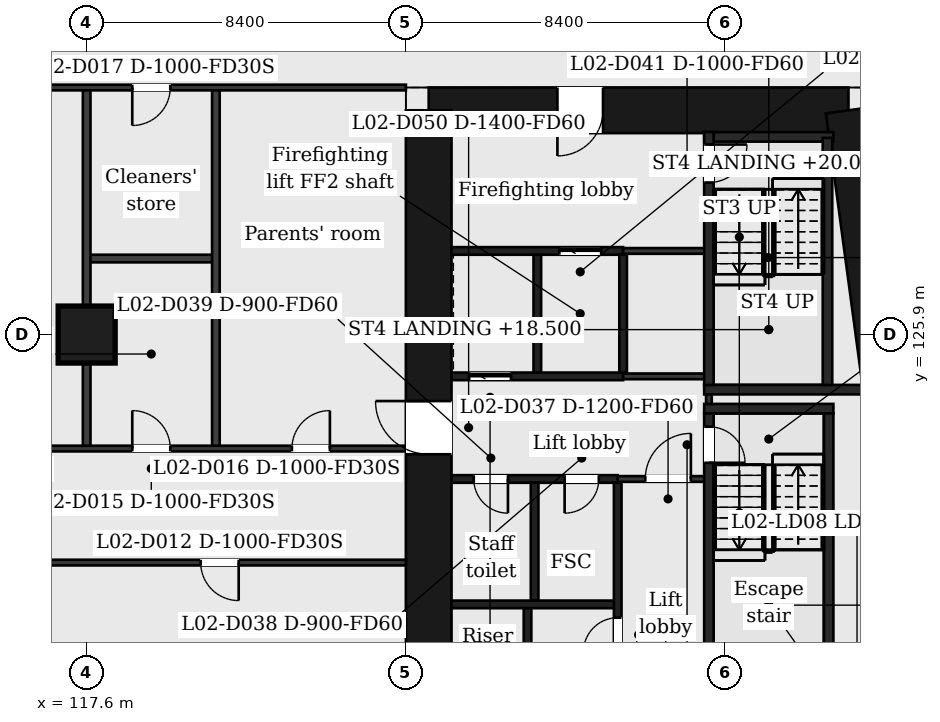
"""IFC4 building model, lengths in metres.
Left out: names, types, materials, properties, quantities, classifications, styles, units other than length and angle.
Written with IfcOpenShell. Run it as: python <this file> out.ifc"""

import sys

from ifc_helpers import new_model, si_unit, direction, frame, frame_2d, origin, origin_2d, place, context, subcontext, project, spatial, rectangle, extrude, element, fill, save


model = new_model("IFC4")
c1 = context("Model", 3, precision=1e-05, world=origin(), true_north=direction((0.0, 1.0)))
c2 = subcontext(c1, "Body", "Model", "MODEL_VIEW")
j1 = project(units=[si_unit("LENGTHUNIT", "METRE"), si_unit("PLANEANGLEUNIT", "RADIAN")], contexts=[c1])
p1 = place(None, origin())
s1 = spatial("IfcSite", under=j1, at=p1, CompositionType="ELEMENT")
p2 = place(p1, origin())
s2 = spatial("IfcBuilding", under=s1, at=p2, CompositionType="ELEMENT")
p3 = place(p2, frame((0.0, 0.0, 17.0)))
s3 = spatial("IfcBuildingStorey", under=s2, at=p3, CompositionType="ELEMENT", Elevation=17.0)
p4 = place(p3, frame((126.6, 131.8, 0.0), z_axis=(0.0, 0.0, 1.0), x_axis=(1.0, 0.0, 0.0)))
e1 = element("IfcWall", 1, at=p4, inside=s3, PredefinedType="SHEAR", context=c2, shape_type="SweptSolid", body=[
    extrude(rectangle(XDim=11.044, YDim=1.2, at=frame_2d((5.522, 0.0))), origin(), (0.0, 0.0, 1.0), 6.0),
])
p5 = place(p4, frame((3.386, 0.0, 0.0)))
e2 = element("IfcOpeningElement", 2, at=p5, cuts=e1, PredefinedType="OPENING", context=c2, shape_type="SweptSolid", body=[
    extrude(rectangle(XDim=1.2, YDim=2.1, at=frame_2d((0.6, 1.05))), frame((0.0, 0.61, 0.0), z_axis=(0.0, -1.0, 0.0), x_axis=(1.0, 0.0, 0.0)), (0.0, 0.0, 1.0), 1.22),
])
p6 = place(p3, frame((137.645, 131.8, 0.0), z_axis=(0.0, 0.0, 1.0), x_axis=(0.133413989637, -0.99106039542, 0.0)))
e3 = element("IfcWall", 3, at=p6, inside=s3, PredefinedType="SHEAR", context=c2, shape_type="SweptSolid", body=[
    extrude(rectangle(XDim=20.988, YDim=1.2, at=frame_2d((10.494, 0.0))), origin(), (0.0, 0.0, 1.0), 6.0),
])
p7 = place(p3, frame((126.6, 111.0, 0.0), z_axis=(0.0, 0.0, 1.0), x_axis=(0.0, 1.0, 0.0)))
e4 = element("IfcWall", 4, at=p7, inside=s3, PredefinedType="SHEAR", context=c2, shape_type="SweptSolid", body=[
    extrude(rectangle(XDim=20.8, YDim=1.2, at=frame_2d((10.4, 0.0))), origin(), (0.0, 0.0, 1.0), 6.0),
])
p8 = place(p7, frame((11.75, 0.0, 0.0)))
e5 = element("IfcOpeningElement", 5, at=p8, cuts=e4, PredefinedType="OPENING", context=c2, shape_type="SweptSolid", body=[
    extrude(rectangle(XDim=1.4, YDim=2.1, at=frame_2d((0.7, 1.05))), frame((0.0, 0.61, 0.0), z_axis=(0.0, -1.0, 0.0), x_axis=(1.0, 0.0, 0.0)), (0.0, 0.0, 1.0), 1.22),
])
p9 = place(p3, frame((117.6, 125.9, 0.0), z_axis=(0.0, 0.0, 1.0), x_axis=(1.0, 0.0, 0.0)))
e6 = element("IfcColumn", 6, at=p9, inside=s3, PredefinedType="COLUMN", context=c2, shape_type="SweptSolid", body=[
    extrude(rectangle(XDim=1.5, YDim=1.5, at=origin_2d()), origin(), (0.0, 0.0, 1.0), 6.0),
])
p10 = place(p3, frame((127.2, 118.8, 0.0), z_axis=(0.0, 0.0, 1.0), x_axis=(1.0, 0.0, 0.0)))
e7 = element("IfcWall", 7, at=p10, inside=s3, PredefinedType="PARTITIONING", context=c2, shape_type="SweptSolid", body=[
    extrude(rectangle(XDim=4.373, YDim=0.2, at=frame_2d((2.187, 0.0))), origin(), (0.0, 0.0, 1.0), 5.5),
])
p11 = place(p3, frame((100.8, 119.9, 0.0), z_axis=(0.0, 0.0, 1.0), x_axis=(1.0, 0.0, 0.0)))
e8 = element("IfcWall", 8, at=p11, inside=s3, PredefinedType="PARTITIONING", context=c2, shape_type="SweptSolid", body=[
    extrude(rectangle(XDim=25.2, YDim=0.15, at=frame_2d((12.6, 0.0))), origin(), (0.0, 0.0, 1.0), 5.5),
])
p12 = place(p11, frame((3.7, 0.0, 0.0)))
e9 = element("IfcOpeningElement", 9, at=p12, cuts=e8, PredefinedType="OPENING", context=c2, shape_type="SweptSolid", body=[
    extrude(rectangle(XDim=1.0, YDim=2.1, at=frame_2d((0.5, 1.05))), frame((0.0, 0.085, 0.0), z_axis=(0.0, -1.0, 0.0), x_axis=(1.0, 0.0, 0.0)), (0.0, 0.0, 1.0), 0.17),
])
p13 = place(p11, frame((11.4, 0.0, 0.0)))
e10 = element("IfcOpeningElement", 10, at=p13, cuts=e8, PredefinedType="OPENING", context=c2, shape_type="SweptSolid", body=[
    extrude(rectangle(XDim=1.0, YDim=2.1, at=frame_2d((0.5, 1.05))), frame((0.0, 0.085, 0.0), z_axis=(0.0, -1.0, 0.0), x_axis=(1.0, 0.0, 0.0)), (0.0, 0.0, 1.0), 0.17),
])
p14 = place(p11, frame((19.8, 0.0, 0.0)))
e11 = element("IfcOpeningElement", 11, at=p14, cuts=e8, PredefinedType="OPENING", context=c2, shape_type="SweptSolid", body=[
    extrude(rectangle(XDim=1.0, YDim=2.1, at=frame_2d((0.5, 1.05))), frame((0.0, 0.085, 0.0), z_axis=(0.0, -1.0, 0.0), x_axis=(1.0, 0.0, 0.0)), (0.0, 0.0, 1.0), 0.17),
])
p15 = place(p3, frame((127.2, 122.1, 0.0), z_axis=(0.0, 0.0, 1.0), x_axis=(1.0, 0.0, 0.0)))
e12 = element("IfcWall", 12, at=p15, inside=s3, PredefinedType="PARTITIONING", context=c2, shape_type="SweptSolid", body=[
    extrude(rectangle(XDim=4.373, YDim=0.2, at=frame_2d((2.187, 0.0))), origin(), (0.0, 0.0, 1.0), 5.5),
])
p16 = place(p15, frame((2.976, 0.0, 0.0)))
e13 = element("IfcOpeningElement", 13, at=p16, cuts=e12, PredefinedType="OPENING", context=c2, shape_type="SweptSolid", body=[
    extrude(rectangle(XDim=0.9, YDim=2.1, at=frame_2d((0.45, 1.05))), frame((0.0, 0.11, 0.0), z_axis=(0.0, -1.0, 0.0), x_axis=(1.0, 0.0, 0.0)), (0.0, 0.0, 1.0), 0.22),
])
p17 = place(p15, frame((0.585, 0.0, 0.0)))
e14 = element("IfcOpeningElement", 14, at=p17, cuts=e12, PredefinedType="OPENING", context=c2, shape_type="SweptSolid", body=[
    extrude(rectangle(XDim=0.9, YDim=2.1, at=frame_2d((0.45, 1.05))), frame((0.0, 0.11, 0.0), z_axis=(0.0, -1.0, 0.0), x_axis=(1.0, 0.0, 0.0)), (0.0, 0.0, 1.0), 0.22),
])
p18 = place(p3, frame((131.573, 122.1, 0.0), z_axis=(0.0, 0.0, 1.0), x_axis=(1.0, 0.0, 0.0)))
e15 = element("IfcWall", 15, at=p18, inside=s3, PredefinedType="PARTITIONING", context=c2, shape_type="SweptSolid", body=[
    extrude(rectangle(XDim=2.4, YDim=0.15, at=frame_2d((1.2, 0.0))), origin(), (0.0, 0.0, 1.0), 5.5),
])
p19 = place(p18, frame((0.725, 0.0, 0.0)))
e16 = element("IfcOpeningElement", 16, at=p19, cuts=e15, PredefinedType="OPENING", context=c2, shape_type="SweptSolid", body=[
    extrude(rectangle(XDim=1.2, YDim=2.1, at=frame_2d((0.6, 1.05))), frame((0.0, 0.085, 0.0), z_axis=(0.0, -1.0, 0.0), x_axis=(1.0, 0.0, 0.0)), (0.0, 0.0, 1.0), 0.17),
])
p20 = place(p3, frame((100.8, 122.9, 0.0), z_axis=(0.0, 0.0, 1.0), x_axis=(1.0, 0.0, 0.0)))
e17 = element("IfcWall", 17, at=p20, inside=s3, PredefinedType="PARTITIONING", context=c2, shape_type="SweptSolid", body=[
    extrude(rectangle(XDim=25.2, YDim=0.15, at=frame_2d((12.6, 0.0))), origin(), (0.0, 0.0, 1.0), 5.5),
])
p21 = place(p20, frame((3.7, 0.0, 0.0)))
e18 = element("IfcOpeningElement", 18, at=p21, cuts=e17, PredefinedType="OPENING", context=c2, shape_type="SweptSolid", body=[
    extrude(rectangle(XDim=1.0, YDim=2.1, at=frame_2d((0.5, 1.05))), frame((0.0, 0.085, 0.0), z_axis=(0.0, -1.0, 0.0), x_axis=(1.0, 0.0, 0.0)), (0.0, 0.0, 1.0), 0.17),
])
p22 = place(p20, frame((12.1, 0.0, 0.0)))
e19 = element("IfcOpeningElement", 19, at=p22, cuts=e17, PredefinedType="OPENING", context=c2, shape_type="SweptSolid", body=[
    extrude(rectangle(XDim=1.0, YDim=2.1, at=frame_2d((0.5, 1.05))), frame((0.0, 0.085, 0.0), z_axis=(0.0, -1.0, 0.0), x_axis=(1.0, 0.0, 0.0)), (0.0, 0.0, 1.0), 0.17),
])
p23 = place(p20, frame((18.0, 0.0, 0.0)))
e20 = element("IfcOpeningElement", 20, at=p23, cuts=e17, PredefinedType="OPENING", context=c2, shape_type="SweptSolid", body=[
    extrude(rectangle(XDim=1.0, YDim=2.1, at=frame_2d((0.5, 1.05))), frame((0.0, 0.085, 0.0), z_axis=(0.0, -1.0, 0.0), x_axis=(1.0, 0.0, 0.0)), (0.0, 0.0, 1.0), 0.17),
])
p24 = place(p20, frame((22.2, 0.0, 0.0)))
e21 = element("IfcOpeningElement", 21, at=p24, cuts=e17, PredefinedType="OPENING", context=c2, shape_type="SweptSolid", body=[
    extrude(rectangle(XDim=1.0, YDim=2.1, at=frame_2d((0.5, 1.05))), frame((0.0, 0.085, 0.0), z_axis=(0.0, -1.0, 0.0), x_axis=(1.0, 0.0, 0.0)), (0.0, 0.0, 1.0), 0.17),
])
p25 = place(p3, frame((133.848, 123.95, 0.0), z_axis=(0.0, 0.0, 1.0), x_axis=(1.0, 0.0, 0.0)))
e22 = element("IfcWall", 22, at=p25, inside=s3, PredefinedType="PARTITIONING", context=c2, shape_type="SweptSolid", body=[
    extrude(rectangle(XDim=3.4, YDim=0.25, at=frame_2d((1.7, 0.0))), origin(), (0.0, 0.0, 1.0), 5.5),
])
p26 = place(p3, frame((133.848, 124.45, 0.0), z_axis=(0.0, 0.0, 1.0), x_axis=(1.0, 0.0, 0.0)))
e23 = element("IfcWall", 23, at=p26, inside=s3, PredefinedType="PARTITIONING", context=c2, shape_type="SweptSolid", body=[
    extrude(rectangle(XDim=4.211, YDim=0.25, at=frame_2d((2.105, 0.0))), origin(), (0.0, 0.0, 1.0), 5.5),
])
p27 = place(p3, frame((127.2, 124.8, 0.0), z_axis=(0.0, 0.0, 1.0), x_axis=(1.0, 0.0, 0.0)))
e24 = element("IfcWall", 24, at=p27, inside=s3, PredefinedType="PARTITIONING", context=c2, shape_type="SweptSolid", body=[
    extrude(rectangle(XDim=4.515, YDim=0.2, at=frame_2d((2.258, 0.0))), origin(), (0.0, 0.0, 1.0), 5.5),
])
p28 = place(p27, frame((0.464, 0.0, 0.0)))
e25 = element("IfcOpeningElement", 25, at=p28, cuts=e24, PredefinedType="OPENING", context=c2, shape_type="SweptSolid", body=[
    extrude(rectangle(XDim=1.1, YDim=2.1, at=frame_2d((0.55, 1.05))), frame((0.0, 0.11, 0.0), z_axis=(0.0, -1.0, 0.0), x_axis=(1.0, 0.0, 0.0)), (0.0, 0.0, 1.0), 0.22),
])
p29 = place(p3, frame((131.715, 124.8, 0.0), z_axis=(0.0, 0.0, 1.0), x_axis=(1.0, 0.0, 0.0)))
e26 = element("IfcWall", 26, at=p29, inside=s3, PredefinedType="PARTITIONING", context=c2, shape_type="SweptSolid", body=[
    extrude(rectangle(XDim=2.383, YDim=0.15, at=frame_2d((1.191, 0.0))), origin(), (0.0, 0.0, 1.0), 5.5),
])
p30 = place(p3, frame((117.6, 127.9, 0.0), z_axis=(0.0, 0.0, 1.0), x_axis=(1.0, 0.0, 0.0)))
e27 = element("IfcWall", 27, at=p30, inside=s3, PredefinedType="PARTITIONING", context=c2, shape_type="SweptSolid", body=[
    extrude(rectangle(XDim=3.4, YDim=0.2, at=frame_2d((1.7, 0.0))), origin(), (0.0, 0.0, 1.0), 5.5),
])
p31 = place(p3, frame((127.2, 128.1, 0.0), z_axis=(0.0, 0.0, 1.0), x_axis=(1.0, 0.0, 0.0)))
e28 = element("IfcWall", 28, at=p31, inside=s3, PredefinedType="PARTITIONING", context=c2, shape_type="SweptSolid", body=[
    extrude(rectangle(XDim=4.515, YDim=0.2, at=frame_2d((2.258, 0.0))), origin(), (0.0, 0.0, 1.0), 5.5),
])
p32 = place(p31, frame((2.837, 0.0, 0.0)))
e29 = element("IfcOpeningElement", 29, at=p32, cuts=e28, PredefinedType="OPENING", context=c2, shape_type="SweptSolid", body=[
    extrude(rectangle(XDim=1.1, YDim=2.1, at=frame_2d((0.55, 1.05))), frame((0.0, 0.11, 0.0), z_axis=(0.0, -1.0, 0.0), x_axis=(1.0, 0.0, 0.0)), (0.0, 0.0, 1.0), 0.22),
])
p33 = place(p3, frame((131.715, 128.1, 0.0), z_axis=(0.0, 0.0, 1.0), x_axis=(1.0, 0.0, 0.0)))
e30 = element("IfcWall", 30, at=p33, inside=s3, PredefinedType="PARTITIONING", context=c2, shape_type="SweptSolid", body=[
    extrude(rectangle(XDim=2.258, YDim=0.15, at=frame_2d((1.129, 0.0))), origin(), (0.0, 0.0, 1.0), 5.5),
])
p34 = place(p3, frame((133.848, 131.101, 0.0), z_axis=(0.0, 0.0, 1.0), x_axis=(1.0, 0.0, 0.0)))
e31 = element("IfcWall", 31, at=p34, inside=s3, PredefinedType="PARTITIONING", context=c2, shape_type="SweptSolid", body=[
    extrude(rectangle(XDim=3.4, YDim=0.25, at=frame_2d((1.7, 0.0))), origin(), (0.0, 0.0, 1.0), 5.5),
])
p35 = place(p3, frame((100.8, 132.4, 0.0), z_axis=(0.0, 0.0, 1.0), x_axis=(1.0, 0.0, 0.0)))
e32 = element("IfcWall", 32, at=p35, inside=s3, PredefinedType="PARTITIONING", context=c2, shape_type="SweptSolid", body=[
    extrude(rectangle(XDim=25.2, YDim=0.15, at=frame_2d((12.6, 0.0))), origin(), (0.0, 0.0, 1.0), 5.5),
])
p36 = place(p35, frame((18.0, 0.0, 0.0)))
e33 = element("IfcOpeningElement", 33, at=p36, cuts=e32, PredefinedType="OPENING", context=c2, shape_type="SweptSolid", body=[
    extrude(rectangle(XDim=1.0, YDim=2.1, at=frame_2d((0.5, 1.05))), frame((0.0, 0.085, 0.0), z_axis=(0.0, -1.0, 0.0), x_axis=(1.0, 0.0, 0.0)), (0.0, 0.0, 1.0), 0.17),
])
for number, where, z_axis, x_axis in (
    (34, (117.6, 122.975, 0.0), (0.0, 0.0, 1.0), (0.0, 1.0, 0.0)),
    (35, (121.0, 122.975, 0.0), (0.0, 0.0, 1.0), (0.0, 1.0, 0.0)),
):
    element("IfcWall", number, at=place(p3, frame(where, z_axis=z_axis, x_axis=x_axis)), inside=s3, PredefinedType="PARTITIONING", context=c2, shape_type="SweptSolid", body=[
        extrude(rectangle(XDim=9.35, YDim=0.2, at=frame_2d((4.675, 0.0))), origin(), (0.0, 0.0, 1.0), 5.5),
    ])
p37 = place(p3, frame((129.2, 117.2, 0.0), z_axis=(0.0, 0.0, 1.0), x_axis=(0.0, 1.0, 0.0)))
e36 = element("IfcWall", 36, at=p37, inside=s3, PredefinedType="PARTITIONING", context=c2, shape_type="SweptSolid", body=[
    extrude(rectangle(XDim=1.5, YDim=0.2, at=frame_2d((0.75, 0.0))), origin(), (0.0, 0.0, 1.0), 5.5),
])
for number, where, z_axis, x_axis in (
    (37, (129.386, 118.9, 0.0), (0.0, 0.0, 1.0), (0.0, 1.0, 0.0)),
    (38, (129.458, 124.9, 0.0), (0.0, 0.0, 1.0), (0.0, 1.0, 0.0)),
):
    element("IfcWall", number, at=place(p3, frame(where, z_axis=z_axis, x_axis=x_axis)), inside=s3, PredefinedType="PARTITIONING", context=c2, shape_type="SweptSolid", body=[
        extrude(rectangle(XDim=3.1, YDim=0.2, at=frame_2d((1.55, 0.0))), origin(), (0.0, 0.0, 1.0), 5.5),
    ])
p38 = place(p3, frame((131.573, 117.2, 0.0), z_axis=(0.0, 0.0, 1.0), x_axis=(0.0, 1.0, 0.0)))
e39 = element("IfcWall", 39, at=p38, inside=s3, PredefinedType="PARTITIONING", context=c2, shape_type="SweptSolid", body=[
    extrude(rectangle(XDim=4.8, YDim=0.2, at=frame_2d((2.4, 0.0))), origin(), (0.0, 0.0, 1.0), 5.5),
])
p39 = place(p38, frame((0.35, 0.0, 0.0)))
e40 = element("IfcOpeningElement", 40, at=p39, cuts=e39, PredefinedType="OPENING", context=c2, shape_type="SweptSolid", body=[
    extrude(rectangle(XDim=0.9, YDim=2.1, at=frame_2d((0.45, 1.05))), frame((0.0, 0.11, 0.0), z_axis=(0.0, -1.0, 0.0), x_axis=(1.0, 0.0, 0.0)), (0.0, 0.0, 1.0), 0.22),
])
p40 = place(p3, frame((131.715, 124.9, 0.0), z_axis=(0.0, 0.0, 1.0), x_axis=(0.0, 1.0, 0.0)))
e41 = element("IfcWall", 41, at=p40, inside=s3, PredefinedType="PARTITIONING", context=c2, shape_type="SweptSolid", body=[
    extrude(rectangle(XDim=3.1, YDim=0.2, at=frame_2d((1.55, 0.0))), origin(), (0.0, 0.0, 1.0), 5.5),
])
p41 = place(p3, frame((133.973, 124.075, 0.0), z_axis=(0.0, 0.0, 1.0), x_axis=(0.0, 1.0, 0.0)))
e42 = element("IfcWall", 42, at=p41, inside=s3, PredefinedType="PARTITIONING", context=c2, shape_type="SweptSolid", body=[
    extrude(rectangle(XDim=0.25, YDim=0.15, at=frame_2d((0.125, 0.0))), origin(), (0.0, 0.0, 1.0), 5.5),
])
p42 = place(p3, frame((133.973, 117.17, 0.0), z_axis=(0.0, 0.0, 1.0), x_axis=(0.0, 1.0, 0.0)))
e43 = element("IfcWall", 43, at=p42, inside=s3, PredefinedType="PARTITIONING", context=c2, shape_type="SweptSolid", body=[
    extrude(rectangle(XDim=6.655, YDim=0.25, at=frame_2d((3.328, 0.0))), origin(), (0.0, 0.0, 1.0), 5.5),
])
p43 = place(p42, frame((5.355, 0.0, 0.0)))
e44 = element("IfcOpeningElement", 44, at=p43, cuts=e43, PredefinedType="OPENING", context=c2, shape_type="SweptSolid", body=[
    extrude(rectangle(XDim=0.95, YDim=2.1, at=frame_2d((0.475, 1.05))), frame((0.0, 0.135, 0.0), z_axis=(0.0, -1.0, 0.0), x_axis=(1.0, 0.0, 0.0)), (0.0, 0.0, 1.0), 0.27),
])
p44 = place(p3, frame((133.973, 124.575, 0.0), z_axis=(0.0, 0.0, 1.0), x_axis=(0.0, 1.0, 0.0)))
e45 = element("IfcWall", 45, at=p44, inside=s3, PredefinedType="PARTITIONING", context=c2, shape_type="SweptSolid", body=[
    extrude(rectangle(XDim=6.655, YDim=0.25, at=frame_2d((3.328, 0.0))), origin(), (0.0, 0.0, 1.0), 5.5),
])
p45 = place(p44, frame((5.325, 0.0, 0.0)))
e46 = element("IfcOpeningElement", 46, at=p45, cuts=e45, PredefinedType="OPENING", context=c2, shape_type="SweptSolid", body=[
    extrude(rectangle(XDim=1.0, YDim=2.1, at=frame_2d((0.5, 1.05))), frame((0.0, 0.135, 0.0), z_axis=(0.0, -1.0, 0.0), x_axis=(1.0, 0.0, 0.0)), (0.0, 0.0, 1.0), 0.27),
])
p46 = place(p3, frame((137.123, 117.17, 0.0), z_axis=(0.0, 0.0, 1.0), x_axis=(0.0, 1.0, 0.0)))
e47 = element("IfcWall", 47, at=p46, inside=s3, PredefinedType="PARTITIONING", context=c2, shape_type="SweptSolid", body=[
    extrude(rectangle(XDim=6.655, YDim=0.25, at=frame_2d((3.328, 0.0))), origin(), (0.0, 0.0, 1.0), 5.5),
])
p47 = place(p3, frame((137.093, 124.575, 0.0), z_axis=(0.0, 0.0, 1.0), x_axis=(0.0, 1.0, 0.0)))
e48 = element("IfcWall", 48, at=p47, inside=s3, PredefinedType="PARTITIONING", context=c2, shape_type="SweptSolid", body=[
    extrude(rectangle(XDim=6.5, YDim=0.25, at=frame_2d((3.25, 0.0))), origin(), (0.0, 0.0, 1.0), 5.5),
])
p48 = place(p14, origin())
e49 = element("IfcDoor", 49, at=p48, inside=s3, OperationType="SINGLE_SWING_RIGHT", PredefinedType="DOOR", context=c2, shape_type="SweptSolid", body=[
    extrude(rectangle(XDim=1.0, YDim=2.1, at=frame_2d((0.5, 1.05))), frame((0.0, 0.025, 0.0), z_axis=(0.0, -1.0, 0.0), x_axis=(1.0, 0.0, 0.0)), (0.0, 0.0, 1.0), 0.05),
])
fill(e11, e49)
p49 = place(p23, origin())
e50 = element("IfcDoor", 50, at=p49, inside=s3, OperationType="SINGLE_SWING_LEFT", PredefinedType="DOOR", context=c2, shape_type="SweptSolid", body=[
    extrude(rectangle(XDim=1.0, YDim=2.1, at=frame_2d((0.5, 1.05))), frame((0.0, 0.025, 0.0), z_axis=(0.0, -1.0, 0.0), x_axis=(1.0, 0.0, 0.0)), (0.0, 0.0, 1.0), 0.05),
])
fill(e20, e50)
p50 = place(p24, origin())
e51 = element("IfcDoor", 51, at=p50, inside=s3, OperationType="SINGLE_SWING_RIGHT", PredefinedType="DOOR", context=c2, shape_type="SweptSolid", body=[
    extrude(rectangle(XDim=1.0, YDim=2.1, at=frame_2d((0.5, 1.05))), frame((0.0, 0.025, 0.0), z_axis=(0.0, -1.0, 0.0), x_axis=(1.0, 0.0, 0.0)), (0.0, 0.0, 1.0), 0.05),
])
fill(e21, e51)
p51 = place(p36, origin())
e52 = element("IfcDoor", 52, at=p51, inside=s3, OperationType="SINGLE_SWING_LEFT", PredefinedType="DOOR", context=c2, shape_type="SweptSolid", body=[
    extrude(rectangle(XDim=1.0, YDim=2.1, at=frame_2d((0.5, 1.05))), frame((0.0, 0.025, 0.0), z_axis=(0.0, -1.0, 0.0), x_axis=(1.0, 0.0, 0.0)), (0.0, 0.0, 1.0), 0.05),
])
fill(e33, e52)
p52 = place(p19, origin())
e53 = element("IfcDoor", 53, at=p52, inside=s3, OperationType="SINGLE_SWING_RIGHT", PredefinedType="DOOR", context=c2, shape_type="SweptSolid", body=[
    extrude(rectangle(XDim=1.2, YDim=2.1, at=frame_2d((0.6, 1.05))), frame((0.0, 0.025, 0.0), z_axis=(0.0, -1.0, 0.0), x_axis=(1.0, 0.0, 0.0)), (0.0, 0.0, 1.0), 0.05),
])
fill(e16, e53)
p53 = place(p32, origin())
e54 = element("IfcDoor", 54, at=p53, inside=s3, OperationType="SLIDING_TO_LEFT", PredefinedType="DOOR", context=c2, shape_type="SweptSolid", body=[
    extrude(rectangle(XDim=1.1, YDim=2.1, at=frame_2d((0.55, 1.05))), frame((0.0, 0.025, 0.0), z_axis=(0.0, -1.0, 0.0), x_axis=(1.0, 0.0, 0.0)), (0.0, 0.0, 1.0), 0.05),
])
fill(e29, e54)
p54 = place(p28, origin())
e55 = element("IfcDoor", 55, at=p54, inside=s3, OperationType="SLIDING_TO_LEFT", PredefinedType="DOOR", context=c2, shape_type="SweptSolid", body=[
    extrude(rectangle(XDim=1.1, YDim=2.1, at=frame_2d((0.55, 1.05))), frame((0.0, 0.025, 0.0), z_axis=(0.0, -1.0, 0.0), x_axis=(1.0, 0.0, 0.0)), (0.0, 0.0, 1.0), 0.05),
])
fill(e25, e55)
p55 = place(p16, origin())
e56 = element("IfcDoor", 56, at=p55, inside=s3, OperationType="SINGLE_SWING_LEFT", PredefinedType="DOOR", context=c2, shape_type="SweptSolid", body=[
    extrude(rectangle(XDim=0.9, YDim=2.1, at=frame_2d((0.45, 1.05))), frame((0.0, 0.025, 0.0), z_axis=(0.0, -1.0, 0.0), x_axis=(1.0, 0.0, 0.0)), (0.0, 0.0, 1.0), 0.05),
])
fill(e13, e56)
p56 = place(p17, origin())
e57 = element("IfcDoor", 57, at=p56, inside=s3, OperationType="SINGLE_SWING_RIGHT", PredefinedType="DOOR", context=c2, shape_type="SweptSolid", body=[
    extrude(rectangle(XDim=0.9, YDim=2.1, at=frame_2d((0.45, 1.05))), frame((0.0, 0.025, 0.0), z_axis=(0.0, -1.0, 0.0), x_axis=(1.0, 0.0, 0.0)), (0.0, 0.0, 1.0), 0.05),
])
fill(e14, e57)
p57 = place(p43, origin())
e58 = element("IfcDoor", 58, at=p57, inside=s3, OperationType="SINGLE_SWING_LEFT", PredefinedType="DOOR", context=c2, shape_type="SweptSolid", body=[
    extrude(rectangle(XDim=0.95, YDim=2.1, at=frame_2d((0.475, 1.05))), frame((0.0, 0.025, 0.0), z_axis=(0.0, -1.0, 0.0), x_axis=(1.0, 0.0, 0.0)), (0.0, 0.0, 1.0), 0.05),
])
fill(e44, e58)
p58 = place(p45, origin())
e59 = element("IfcDoor", 59, at=p58, inside=s3, OperationType="SINGLE_SWING_RIGHT", PredefinedType="DOOR", context=c2, shape_type="SweptSolid", body=[
    extrude(rectangle(XDim=1.0, YDim=2.1, at=frame_2d((0.5, 1.05))), frame((0.0, 0.025, 0.0), z_axis=(0.0, -1.0, 0.0), x_axis=(1.0, 0.0, 0.0)), (0.0, 0.0, 1.0), 0.05),
])
fill(e46, e59)
p59 = place(p39, origin())
e60 = element("IfcDoor", 60, at=p59, inside=s3, OperationType="SINGLE_SWING_LEFT", PredefinedType="DOOR", context=c2, shape_type="SweptSolid", body=[
    extrude(rectangle(XDim=0.9, YDim=2.1, at=frame_2d((0.45, 1.05))), frame((0.0, 0.025, 0.0), z_axis=(0.0, -1.0, 0.0), x_axis=(1.0, 0.0, 0.0)), (0.0, 0.0, 1.0), 0.05),
])
fill(e40, e60)
p60 = place(p5, origin())
e61 = element("IfcDoor", 61, at=p60, inside=s3, OperationType="SINGLE_SWING_LEFT", PredefinedType="DOOR", context=c2, shape_type="SweptSolid", body=[
    extrude(rectangle(XDim=1.2, YDim=2.1, at=frame_2d((0.6, 1.05))), frame((0.0, 0.025, 0.0), z_axis=(0.0, -1.0, 0.0), x_axis=(1.0, 0.0, 0.0)), (0.0, 0.0, 1.0), 0.05),
])
fill(e2, e61)
p61 = place(p8, origin())
e62 = element("IfcDoor", 62, at=p61, inside=s3, OperationType="SINGLE_SWING_RIGHT", PredefinedType="DOOR", context=c2, shape_type="SweptSolid", body=[
    extrude(rectangle(XDim=1.4, YDim=2.1, at=frame_2d((0.7, 1.05))), frame((0.0, 0.025, 0.0), z_axis=(0.0, -1.0, 0.0), x_axis=(1.0, 0.0, 0.0)), (0.0, 0.0, 1.0), 0.05),
])
fill(e5, e62)
save(model, sys.argv[1])
